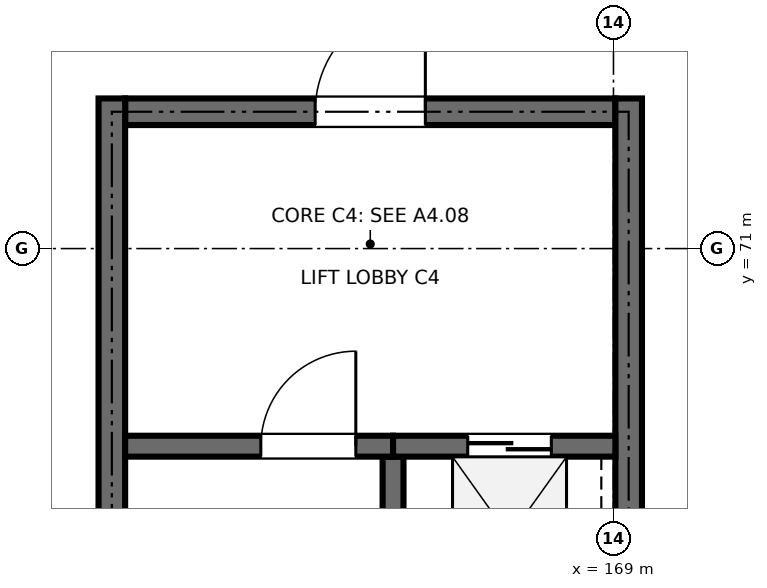
"""IFC4 building model, lengths in metres.
Left out: names, types, materials, properties, quantities, classifications, styles, units other than length and angle.
Written with IfcOpenShell. Run it as: python <this file> out.ifc"""

import sys

from ifc_helpers import new_model, si_unit, direction, frame, frame_2d, origin, place, context, subcontext, project, spatial, rectangle, extrude, element, fill, save


model = new_model("IFC4")
c1 = context("Model", 3, precision=1e-05, world=origin(), true_north=direction((0.0, 1.0)))
c2 = subcontext(c1, "Body", "Model", "MODEL_VIEW")
j1 = project(units=[si_unit("LENGTHUNIT", "METRE"), si_unit("PLANEANGLEUNIT", "RADIAN")], contexts=[c1])
p1 = place(None, origin())
s1 = spatial("IfcSite", under=j1, at=p1, CompositionType="ELEMENT")
p2 = place(p1, origin())
s2 = spatial("IfcBuilding", under=s1, at=p2, CompositionType="ELEMENT")
p3 = place(p2, frame((0.0, 0.0, 14.4)))
s3 = spatial("IfcBuildingStorey", under=s2, at=p3, CompositionType="ELEMENT", Elevation=14.4)
p4 = place(p3, frame((162.575, 72.8, 0.0), z_axis=(0.0, 0.0, 1.0), x_axis=(1.0, 0.0, 0.0)))
e1 = element("IfcWall", 1, at=p4, inside=s3, PredefinedType="SHEAR", context=c2, shape_type="SweptSolid", body=[
    extrude(rectangle(XDim=6.45, YDim=0.35, at=frame_2d((3.225, 0.0))), origin(), (0.0, 0.0, 1.0), 3.96),
])
p5 = place(p4, frame((2.5, 0.0, 0.0)))
e2 = element("IfcOpeningElement", 2, at=p5, cuts=e1, PredefinedType="OPENING", context=c2, shape_type="SweptSolid", body=[
    extrude(rectangle(XDim=1.45, YDim=2.2, at=frame_2d((0.725, 1.1))), frame((0.0, 0.185, 0.0), z_axis=(0.0, -1.0, 0.0), x_axis=(1.0, 0.0, 0.0)), (0.0, 0.0, 1.0), 0.37),
])
for number, where, z_axis, x_axis in (
    (3, (162.4, 61.375, 0.0), (0.0, 0.0, 1.0), (0.0, 1.0, 0.0)),
    (4, (169.2, 61.375, 0.0), (0.0, 0.0, 1.0), (0.0, 1.0, 0.0)),
):
    element("IfcWall", number, at=place(p3, frame(where, z_axis=z_axis, x_axis=x_axis)), inside=s3, PredefinedType="SHEAR", context=c2, shape_type="SweptSolid", body=[
        extrude(rectangle(XDim=11.6, YDim=0.35, at=frame_2d((5.8, 0.0))), origin(), (0.0, 0.0, 1.0), 3.96),
    ])
p6 = place(p3, frame((166.1, 61.375, 0.0), z_axis=(0.0, 0.0, 1.0), x_axis=(0.0, 1.0, 0.0)))
e5 = element("IfcWall", 5, at=p6, inside=s3, PredefinedType="SHEAR", context=c2, shape_type="SweptSolid", body=[
    extrude(rectangle(XDim=6.887, YDim=0.275, at=frame_2d((3.444, 0.0))), origin(), (0.0, 0.0, 1.0), 3.96),
])
p7 = place(p3, frame((162.575, 68.4, 0.0), z_axis=(0.0, 0.0, 1.0), x_axis=(1.0, 0.0, 0.0)))
e6 = element("IfcWall", 6, at=p7, inside=s3, PredefinedType="SHEAR", context=c2, shape_type="SweptSolid", body=[
    extrude(rectangle(XDim=3.525, YDim=0.275, at=frame_2d((1.763, 0.0))), origin(), (0.0, 0.0, 1.0), 3.96),
])
p8 = place(p7, frame((1.785, 0.0, 0.0)))
e7 = element("IfcOpeningElement", 7, at=p8, cuts=e6, PredefinedType="OPENING", context=c2, shape_type="SweptSolid", body=[
    extrude(rectangle(XDim=1.25, YDim=2.15, at=frame_2d((0.625, 1.075))), frame((0.0, 0.147, 0.0), z_axis=(0.0, -1.0, 0.0), x_axis=(1.0, 0.0, 0.0)), (0.0, 0.0, 1.0), 0.295),
])
p9 = place(p3, frame((166.1, 68.4, 0.0), z_axis=(0.0, 0.0, 1.0), x_axis=(1.0, 0.0, 0.0)))
e8 = element("IfcWall", 8, at=p9, inside=s3, PredefinedType="SHEAR", context=c2, shape_type="SweptSolid", body=[
    extrude(rectangle(XDim=2.925, YDim=0.275, at=frame_2d((1.462, 0.0))), origin(), (0.0, 0.0, 1.0), 3.96),
])
p10 = place(p9, frame((0.982, 0.0, 0.0)))
e9 = element("IfcOpeningElement", 9, at=p10, cuts=e8, PredefinedType="OPENING", context=c2, shape_type="SweptSolid", body=[
    extrude(rectangle(XDim=1.1, YDim=2.15, at=frame_2d((0.55, 1.075))), frame((0.0, 0.147, 0.0), z_axis=(0.0, -1.0, 0.0), x_axis=(1.0, 0.0, 0.0)), (0.0, 0.0, 1.0), 0.295),
])
p11 = place(p8, origin())
e10 = element("IfcDoor", 10, at=p11, inside=s3, OperationType="SINGLE_SWING_RIGHT", PredefinedType="DOOR", context=c2, shape_type="SweptSolid", body=[
    extrude(rectangle(XDim=1.25, YDim=2.15, at=frame_2d((0.625, 1.075))), frame((0.0, 0.025, 0.0), z_axis=(0.0, -1.0, 0.0), x_axis=(1.0, 0.0, 0.0)), (0.0, 0.0, 1.0), 0.05),
])
fill(e7, e10)
p12 = place(p10, origin())
e11 = element("IfcDoor", 11, at=p12, inside=s3, OperationType="DOUBLE_DOOR_SLIDING", PredefinedType="DOOR", context=c2, shape_type="SweptSolid", body=[
    extrude(rectangle(XDim=1.1, YDim=2.15, at=frame_2d((0.55, 1.075))), frame((0.0, 0.025, 0.0), z_axis=(0.0, -1.0, 0.0), x_axis=(1.0, 0.0, 0.0)), (0.0, 0.0, 1.0), 0.05),
])
fill(e9, e11)
p13 = place(p5, origin())
e12 = element("IfcDoor", 12, at=p13, inside=s3, OperationType="SINGLE_SWING_RIGHT", PredefinedType="DOOR", context=c2, shape_type="SweptSolid", body=[
    extrude(rectangle(XDim=1.45, YDim=2.2, at=frame_2d((0.725, 1.1))), frame((0.0, 0.025, 0.0), z_axis=(0.0, -1.0, 0.0), x_axis=(1.0, 0.0, 0.0)), (0.0, 0.0, 1.0), 0.05),
])
fill(e2, e12)
save(model, sys.argv[1])
